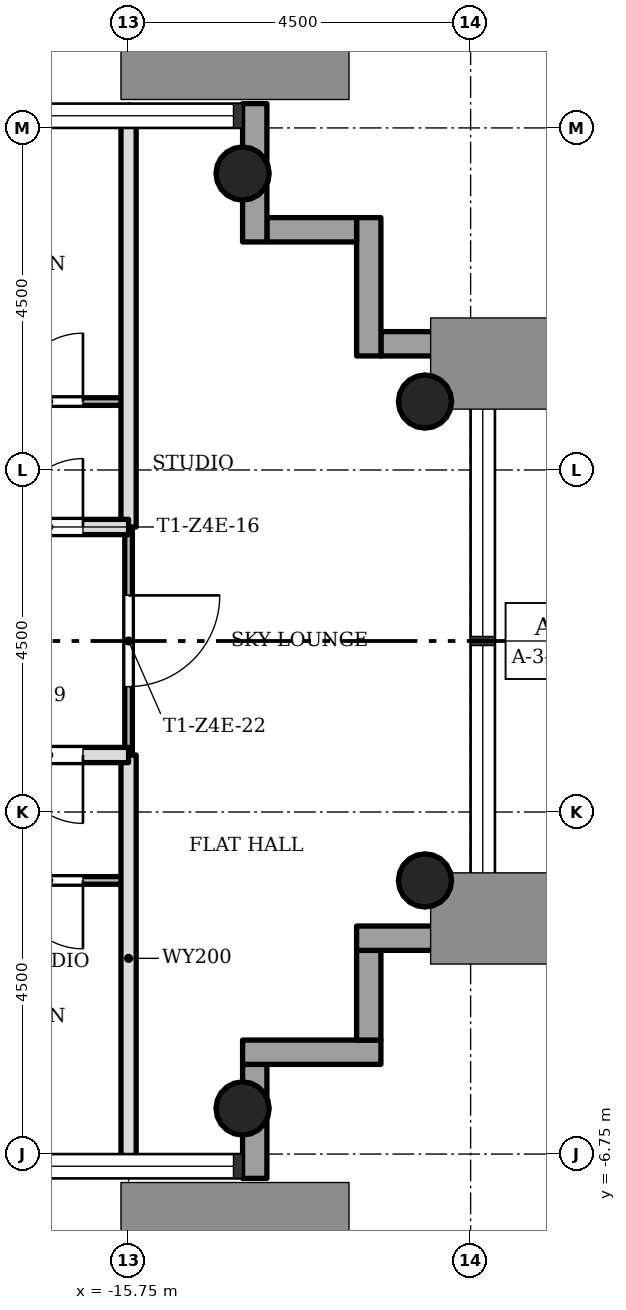
"""IFC4 building model, lengths in metres.
Left out: names, types, materials, properties, quantities, classifications, styles, units other than length and angle.
Written with IfcOpenShell. Run it as: python <this file> out.ifc"""

import sys

from ifc_helpers import new_model, si_unit, direction, frame, frame_2d, origin, origin_2d, place, context, subcontext, project, spatial, rectangle, hollow_circle, extrude, element, fill, save


model = new_model("IFC4")
c1 = context("Model", 3, precision=1e-05, world=origin(), true_north=direction((0.0, 1.0)))
c2 = subcontext(c1, "Body", "Model", "MODEL_VIEW")
j1 = project(units=[si_unit("LENGTHUNIT", "METRE"), si_unit("PLANEANGLEUNIT", "RADIAN")], contexts=[c1])
p1 = place(None, origin())
s1 = spatial("IfcSite", under=j1, at=p1, CompositionType="ELEMENT")
p2 = place(p1, origin())
s2 = spatial("IfcBuilding", under=s1, at=p2, CompositionType="ELEMENT")
p3 = place(p2, frame((0.0, 0.0, 209.6)))
s3 = spatial("IfcBuildingStorey", under=s2, at=p3, CompositionType="ELEMENT", Elevation=209.6)
for number, where, z_axis, x_axis in (
    (1, (-14.25, -6.15, 0.0), (0.0, 0.0, 1.0), (1.0, 0.0, 0.0)),
    (2, (-14.25, 6.15, 0.0), (0.0, 0.0, 1.0), (1.0, 0.0, 0.0)),
    (3, (-11.85, -3.15, 0.0), (0.0, 0.0, 1.0), (1.0, 0.0, 0.0)),
    (4, (-11.85, 3.15, 0.0), (0.0, 0.0, 1.0), (1.0, 0.0, 0.0)),
):
    element("IfcColumn", number, at=place(p3, frame(where, z_axis=z_axis, x_axis=x_axis)), inside=s3, PredefinedType="COLUMN", context=c2, shape_type="SweptSolid", body=[
        extrude(hollow_circle(Radius=0.35, WallThickness=0.025, at=origin_2d()), origin(), (0.0, 0.0, 1.0), 3.4),
    ])
p4 = place(p3, frame((-14.09, -7.07, -0.3), z_axis=(0.0, 0.0, 1.0), x_axis=(0.0, 1.0, 0.0)))
e5 = element("IfcWall", 5, at=p4, inside=s3, PredefinedType="STANDARD", context=c2, shape_type="SweptSolid", body=[
    extrude(rectangle(XDim=1.5, YDim=0.32, at=frame_2d((0.75, 0.0))), origin(), (0.0, 0.0, 1.0), 3.4),
])
p5 = place(p3, frame((-14.25, -5.41, -0.3), z_axis=(0.0, 0.0, 1.0), x_axis=(1.0, 0.0, 0.0)))
e6 = element("IfcWall", 6, at=p5, inside=s3, PredefinedType="STANDARD", context=c2, shape_type="SweptSolid", body=[
    extrude(rectangle(XDim=1.82, YDim=0.32, at=frame_2d((0.91, 0.0))), origin(), (0.0, 0.0, 1.0), 3.4),
])
p6 = place(p3, frame((-12.59, -5.25, -0.3), z_axis=(0.0, 0.0, 1.0), x_axis=(0.0, 1.0, 0.0)))
e7 = element("IfcWall", 7, at=p6, inside=s3, PredefinedType="STANDARD", context=c2, shape_type="SweptSolid", body=[
    extrude(rectangle(XDim=1.18, YDim=0.32, at=frame_2d((0.59, 0.0))), origin(), (0.0, 0.0, 1.0), 3.4),
])
p7 = place(p3, frame((-12.75, -3.91, -0.3), z_axis=(0.0, 0.0, 1.0), x_axis=(1.0, 0.0, 0.0)))
e8 = element("IfcWall", 8, at=p7, inside=s3, PredefinedType="STANDARD", context=c2, shape_type="SweptSolid", body=[
    extrude(rectangle(XDim=1.82, YDim=0.32, at=frame_2d((0.91, 0.0))), origin(), (0.0, 0.0, 1.0), 3.4),
])
p8 = place(p3, frame((-10.93, 3.91, -0.3), z_axis=(0.0, 0.0, 1.0), x_axis=(-1.0, 0.0, 0.0)))
e9 = element("IfcWall", 9, at=p8, inside=s3, PredefinedType="STANDARD", context=c2, shape_type="SweptSolid", body=[
    extrude(rectangle(XDim=1.5, YDim=0.32, at=frame_2d((0.75, 0.0))), origin(), (0.0, 0.0, 1.0), 3.4),
])
p9 = place(p3, frame((-12.59, 3.75, -0.3), z_axis=(0.0, 0.0, 1.0), x_axis=(0.0, 1.0, 0.0)))
e10 = element("IfcWall", 10, at=p9, inside=s3, PredefinedType="STANDARD", context=c2, shape_type="SweptSolid", body=[
    extrude(rectangle(XDim=1.82, YDim=0.32, at=frame_2d((0.91, 0.0))), origin(), (0.0, 0.0, 1.0), 3.4),
])
p10 = place(p3, frame((-12.75, 5.41, -0.3), z_axis=(0.0, 0.0, 1.0), x_axis=(-1.0, 0.0, 0.0)))
e11 = element("IfcWall", 11, at=p10, inside=s3, PredefinedType="STANDARD", context=c2, shape_type="SweptSolid", body=[
    extrude(rectangle(XDim=1.18, YDim=0.32, at=frame_2d((0.59, 0.0))), origin(), (0.0, 0.0, 1.0), 3.4),
])
p11 = place(p3, frame((-14.09, 5.25, -0.3), z_axis=(0.0, 0.0, 1.0), x_axis=(0.0, 1.0, 0.0)))
e12 = element("IfcWall", 12, at=p11, inside=s3, PredefinedType="STANDARD", context=c2, shape_type="SweptSolid", body=[
    extrude(rectangle(XDim=1.82, YDim=0.32, at=frame_2d((0.91, 0.0))), origin(), (0.0, 0.0, 1.0), 3.4),
])
p12 = place(p3, frame((-15.75, -1.5, 0.0), z_axis=(0.0, 0.0, 1.0), x_axis=(0.0, 1.0, 0.0)))
e13 = element("IfcWall", 13, at=p12, inside=s3, PredefinedType="PARTITIONING", context=c2, shape_type="SweptSolid", body=[
    extrude(rectangle(XDim=3.0, YDim=0.1, at=frame_2d((1.5, 0.0))), origin(), (0.0, 0.0, 1.0), 3.0),
])
p13 = place(p12, frame((0.9, 0.0, 0.0)))
e14 = element("IfcOpeningElement", 14, at=p13, cuts=e13, PredefinedType="OPENING", context=c2, shape_type="SweptSolid", body=[
    extrude(rectangle(XDim=1.2, YDim=2.1, at=frame_2d((0.6, 1.05))), frame((0.0, 0.06, 0.0), z_axis=(0.0, -1.0, 0.0), x_axis=(1.0, 0.0, 0.0)), (0.0, 0.0, 1.0), 0.12),
])
for number, where, z_axis, x_axis in (
    (15, (-15.75, -6.85, 0.0), (0.0, 0.0, 1.0), (0.0, 1.0, 0.0)),
    (16, (-15.75, 1.5, 0.0), (0.0, 0.0, 1.0), (0.0, 1.0, 0.0)),
):
    element("IfcWall", number, at=place(p3, frame(where, z_axis=z_axis, x_axis=x_axis)), inside=s3, PredefinedType="SOLIDWALL", context=c2, shape_type="SweptSolid", body=[
        extrude(rectangle(XDim=5.35, YDim=0.2, at=frame_2d((2.675, 0.0))), origin(), (0.0, 0.0, 1.0), 3.0),
    ])
p14 = place(p3, frame((-20.25, -3.15, 0.0), z_axis=(0.0, 0.0, 1.0), x_axis=(1.0, 0.0, 0.0)))
e17 = element("IfcWall", 17, at=p14, inside=s3, PredefinedType="PARTITIONING", context=c2, shape_type="SweptSolid", body=[
    extrude(rectangle(XDim=4.5, YDim=0.1, at=frame_2d((2.25, 0.0))), origin(), (0.0, 0.0, 1.0), 3.0),
])
p15 = place(p14, frame((3.0, 0.0, 0.0)))
e18 = element("IfcOpeningElement", 18, at=p15, cuts=e17, PredefinedType="OPENING", context=c2, shape_type="SweptSolid", body=[
    extrude(rectangle(XDim=0.9, YDim=2.1, at=frame_2d((0.45, 1.05))), frame((0.0, 0.06, 0.0), z_axis=(0.0, -1.0, 0.0), x_axis=(1.0, 0.0, 0.0)), (0.0, 0.0, 1.0), 0.12),
])
p16 = place(p3, frame((-20.25, -1.5, 0.0), z_axis=(0.0, 0.0, 1.0), x_axis=(1.0, 0.0, 0.0)))
e19 = element("IfcWall", 19, at=p16, inside=s3, PredefinedType="SOLIDWALL", context=c2, shape_type="SweptSolid", body=[
    extrude(rectangle(XDim=4.5, YDim=0.2, at=frame_2d((2.25, 0.0))), origin(), (0.0, 0.0, 1.0), 3.0),
])
p17 = place(p16, frame((3.0, 0.0, 0.0)))
e20 = element("IfcOpeningElement", 20, at=p17, cuts=e19, PredefinedType="OPENING", context=c2, shape_type="SweptSolid", body=[
    extrude(rectangle(XDim=0.9, YDim=2.1, at=frame_2d((0.45, 1.05))), frame((0.0, 0.11, 0.0), z_axis=(0.0, -1.0, 0.0), x_axis=(1.0, 0.0, 0.0)), (0.0, 0.0, 1.0), 0.22),
])
p18 = place(p3, frame((-20.25, 1.5, 0.0), z_axis=(0.0, 0.0, 1.0), x_axis=(1.0, 0.0, 0.0)))
e21 = element("IfcWall", 21, at=p18, inside=s3, PredefinedType="SOLIDWALL", context=c2, shape_type="SweptSolid", body=[
    extrude(rectangle(XDim=4.5, YDim=0.2, at=frame_2d((2.25, 0.0))), origin(), (0.0, 0.0, 1.0), 3.0),
])
p19 = place(p18, frame((3.0, 0.0, 0.0)))
e22 = element("IfcOpeningElement", 22, at=p19, cuts=e21, PredefinedType="OPENING", context=c2, shape_type="SweptSolid", body=[
    extrude(rectangle(XDim=0.9, YDim=2.1, at=frame_2d((0.45, 1.05))), frame((0.0, 0.11, 0.0), z_axis=(0.0, -1.0, 0.0), x_axis=(1.0, 0.0, 0.0)), (0.0, 0.0, 1.0), 0.22),
])
p20 = place(p3, frame((-20.25, 3.15, 0.0), z_axis=(0.0, 0.0, 1.0), x_axis=(1.0, 0.0, 0.0)))
e23 = element("IfcWall", 23, at=p20, inside=s3, PredefinedType="PARTITIONING", context=c2, shape_type="SweptSolid", body=[
    extrude(rectangle(XDim=4.5, YDim=0.1, at=frame_2d((2.25, 0.0))), origin(), (0.0, 0.0, 1.0), 3.0),
])
p21 = place(p20, frame((3.0, 0.0, 0.0)))
e24 = element("IfcOpeningElement", 24, at=p21, cuts=e23, PredefinedType="OPENING", context=c2, shape_type="SweptSolid", body=[
    extrude(rectangle(XDim=0.9, YDim=2.1, at=frame_2d((0.45, 1.05))), frame((0.0, 0.06, 0.0), z_axis=(0.0, -1.0, 0.0), x_axis=(1.0, 0.0, 0.0)), (0.0, 0.0, 1.0), 0.12),
])
p22 = place(p19, origin())
e25 = element("IfcDoor", 25, at=p22, inside=s3, OperationType="SINGLE_SWING_LEFT", PredefinedType="DOOR", context=c2, shape_type="SweptSolid", body=[
    extrude(rectangle(XDim=0.9, YDim=2.1, at=frame_2d((0.45, 1.05))), frame((0.0, 0.025, 0.0), z_axis=(0.0, -1.0, 0.0), x_axis=(1.0, 0.0, 0.0)), (0.0, 0.0, 1.0), 0.05),
])
fill(e22, e25)
p23 = place(p21, origin())
e26 = element("IfcDoor", 26, at=p23, inside=s3, OperationType="SINGLE_SWING_LEFT", PredefinedType="DOOR", context=c2, shape_type="SweptSolid", body=[
    extrude(rectangle(XDim=0.9, YDim=2.1, at=frame_2d((0.45, 1.05))), frame((0.0, 0.025, 0.0), z_axis=(0.0, -1.0, 0.0), x_axis=(1.0, 0.0, 0.0)), (0.0, 0.0, 1.0), 0.05),
])
fill(e24, e26)
p24 = place(p17, origin())
e27 = element("IfcDoor", 27, at=p24, inside=s3, OperationType="SINGLE_SWING_RIGHT", PredefinedType="DOOR", context=c2, shape_type="SweptSolid", body=[
    extrude(rectangle(XDim=0.9, YDim=2.1, at=frame_2d((0.45, 1.05))), frame((0.0, 0.025, 0.0), z_axis=(0.0, -1.0, 0.0), x_axis=(1.0, 0.0, 0.0)), (0.0, 0.0, 1.0), 0.05),
])
fill(e20, e27)
p25 = place(p15, origin())
e28 = element("IfcDoor", 28, at=p25, inside=s3, OperationType="SINGLE_SWING_RIGHT", PredefinedType="DOOR", context=c2, shape_type="SweptSolid", body=[
    extrude(rectangle(XDim=0.9, YDim=2.1, at=frame_2d((0.45, 1.05))), frame((0.0, 0.025, 0.0), z_axis=(0.0, -1.0, 0.0), x_axis=(1.0, 0.0, 0.0)), (0.0, 0.0, 1.0), 0.05),
])
fill(e18, e28)
p26 = place(p13, origin())
e29 = element("IfcDoor", 29, at=p26, inside=s3, OperationType="SINGLE_SWING_RIGHT", PredefinedType="DOOR", context=c2, shape_type="SweptSolid", body=[
    extrude(rectangle(XDim=1.2, YDim=2.1, at=frame_2d((0.6, 1.05))), frame((0.0, 0.025, 0.0), z_axis=(0.0, -1.0, 0.0), x_axis=(1.0, 0.0, 0.0)), (0.0, 0.0, 1.0), 0.05),
])
fill(e14, e29)
save(model, sys.argv[1])
